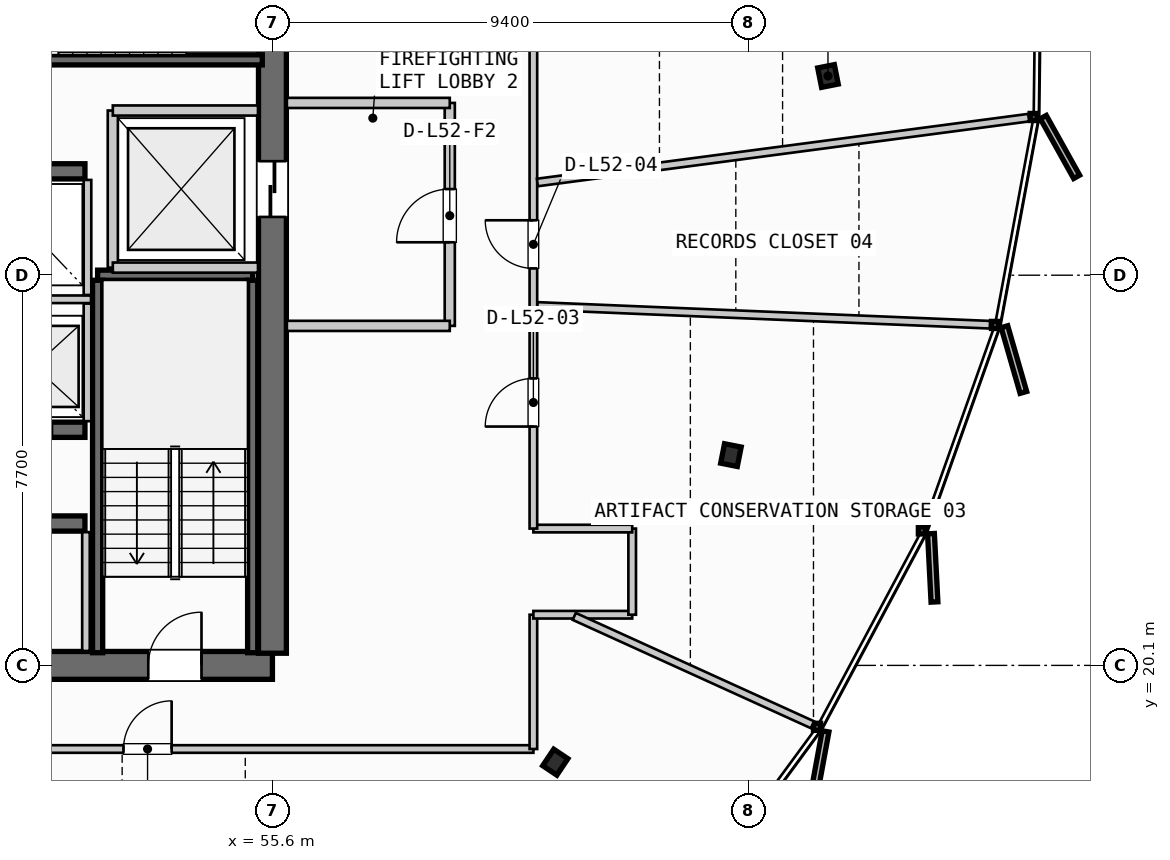
"""IFC4 building model, lengths in metres.
Left out: names, types, materials, properties, quantities, classifications, styles, units other than length and angle.
Written with IfcOpenShell. Run it as: python <this file> out.ifc"""

import sys

from ifc_helpers import new_model, si_unit, direction, frame, frame_2d, origin, origin_2d, place, context, subcontext, project, spatial, rectangle, i_section, extrude, source, transform, mapped, element, fill, save


model = new_model("IFC4")
c1 = context("Model", 3, precision=1e-05, world=origin(), true_north=direction((0.0, 1.0)))
c2 = subcontext(c1, "Body", "Model", "MODEL_VIEW")
j1 = project(units=[si_unit("LENGTHUNIT", "METRE"), si_unit("PLANEANGLEUNIT", "RADIAN")], contexts=[c1])
p1 = place(None, origin())
s1 = spatial("IfcSite", under=j1, at=p1, CompositionType="ELEMENT")
p2 = place(p1, origin())
s2 = spatial("IfcBuilding", under=s1, at=p2, CompositionType="ELEMENT")
p3 = place(p2, frame((0.0, 0.0, 200.9)))
s3 = spatial("IfcBuildingStorey", under=s2, at=p3, CompositionType="ELEMENT", Elevation=200.9)
p4 = place(p3, frame((38.0, 20.1, 0.0), z_axis=(0.0, 0.0, 1.0), x_axis=(1.0, 0.0, 0.0)))
e1 = element("IfcWall", 1, at=p4, inside=s3, PredefinedType="SHEAR", context=c2, shape_type="SweptSolid", body=[
    extrude(rectangle(XDim=17.6, YDim=0.55, at=frame_2d((8.8, 0.0))), origin(), (0.0, 0.0, 1.0), 3.26),
])
p5 = place(p4, frame((1.4, 0.0, 0.0)))
e2 = element("IfcOpeningElement", 2, at=p5, cuts=e1, PredefinedType="OPENING", context=c2, shape_type="SweptSolid", body=[
    extrude(rectangle(XDim=1.05, YDim=2.15, at=frame_2d((0.525, 1.075))), frame((0.0, 0.285, 0.0), z_axis=(0.0, -1.0, 0.0), x_axis=(1.0, 0.0, 0.0)), (0.0, 0.0, 1.0), 0.57),
])
p6 = place(p4, frame((15.15, 0.0, 0.0)))
e3 = element("IfcOpeningElement", 3, at=p6, cuts=e1, PredefinedType="OPENING", context=c2, shape_type="SweptSolid", body=[
    extrude(rectangle(XDim=1.05, YDim=2.15, at=frame_2d((0.525, 1.075))), frame((0.0, 0.285, 0.0), z_axis=(0.0, -1.0, 0.0), x_axis=(1.0, 0.0, 0.0)), (0.0, 0.0, 1.0), 0.57),
])
p7 = place(p4, frame((5.25, 0.0, 0.0)))
e4 = element("IfcOpeningElement", 4, at=p7, cuts=e1, PredefinedType="OPENING", context=c2, shape_type="SweptSolid", body=[
    extrude(rectangle(XDim=0.95, YDim=2.15, at=frame_2d((0.475, 1.075))), frame((0.0, 0.285, 0.0), z_axis=(0.0, -1.0, 0.0), x_axis=(1.0, 0.0, 0.0)), (0.0, 0.0, 1.0), 0.57),
])
p8 = place(p4, frame((11.4, 0.0, 0.0)))
e5 = element("IfcOpeningElement", 5, at=p8, cuts=e1, PredefinedType="OPENING", context=c2, shape_type="SweptSolid", body=[
    extrude(rectangle(XDim=0.95, YDim=2.15, at=frame_2d((0.475, 1.075))), frame((0.0, 0.285, 0.0), z_axis=(0.0, -1.0, 0.0), x_axis=(1.0, 0.0, 0.0)), (0.0, 0.0, 1.0), 0.57),
])
p9 = place(p3, frame((55.6, 20.34, 0.0), z_axis=(0.0, 0.0, 1.0), x_axis=(0.0, 1.0, 0.0)))
e6 = element("IfcWall", 6, at=p9, inside=s3, PredefinedType="SHEAR", context=c2, shape_type="SweptSolid", body=[
    extrude(rectangle(XDim=14.92, YDim=0.55, at=frame_2d((7.46, 0.0))), origin(), (0.0, 0.0, 1.0), 3.26),
])
p10 = place(p9, frame((12.71, 0.0, 0.0)))
e7 = element("IfcOpeningElement", 7, at=p10, cuts=e6, PredefinedType="OPENING", context=c2, shape_type="SweptSolid", body=[
    extrude(rectangle(XDim=1.05, YDim=2.15, at=frame_2d((0.525, 1.075))), frame((0.0, 0.285, 0.0), z_axis=(0.0, -1.0, 0.0), x_axis=(1.0, 0.0, 0.0)), (0.0, 0.0, 1.0), 0.57),
])
p11 = place(p9, frame((8.61, 0.0, 0.0)))
e8 = element("IfcOpeningElement", 8, at=p11, cuts=e6, PredefinedType="OPENING", context=c2, shape_type="SweptSolid", body=[
    extrude(rectangle(XDim=1.1, YDim=2.2, at=frame_2d((0.55, 1.1))), frame((0.0, 0.285, 0.0), z_axis=(0.0, -1.0, 0.0), x_axis=(1.0, 0.0, 0.0)), (0.0, 0.0, 1.0), 0.57),
])
p12 = place(p3, frame((47.65, 22.9, 0.0), z_axis=(0.0, 0.0, 1.0), x_axis=(1.0, 0.0, 0.0)))
e9 = element("IfcWall", 9, at=p12, inside=s3, PredefinedType="SHEAR", context=c2, shape_type="SweptSolid", body=[
    extrude(rectangle(XDim=4.25, YDim=0.3, at=frame_2d((2.125, 0.0))), origin(), (0.0, 0.0, 1.0), 3.26),
])
p13 = place(p3, frame((47.65, 24.75, 0.0), z_axis=(0.0, 0.0, 1.0), x_axis=(1.0, 0.0, 0.0)))
e10 = element("IfcWall", 10, at=p13, inside=s3, PredefinedType="SHEAR", context=c2, shape_type="SweptSolid", body=[
    extrude(rectangle(XDim=4.25, YDim=0.3, at=frame_2d((2.125, 0.0))), origin(), (0.0, 0.0, 1.0), 3.26),
])
p14 = place(p13, frame((0.45, 0.0, 0.0)))
e11 = element("IfcOpeningElement", 11, at=p14, cuts=e10, PredefinedType="OPENING", context=c2, shape_type="SweptSolid", body=[
    extrude(rectangle(XDim=1.1, YDim=2.2, at=frame_2d((0.55, 1.1))), frame((0.0, 0.16, 0.0), z_axis=(0.0, -1.0, 0.0), x_axis=(1.0, 0.0, 0.0)), (0.0, 0.0, 1.0), 0.32),
])
p15 = place(p13, frame((2.5, 0.0, 0.0)))
e12 = element("IfcOpeningElement", 12, at=p15, cuts=e10, PredefinedType="OPENING", context=c2, shape_type="SweptSolid", body=[
    extrude(rectangle(XDim=1.1, YDim=2.2, at=frame_2d((0.55, 1.1))), frame((0.0, 0.16, 0.0), z_axis=(0.0, -1.0, 0.0), x_axis=(1.0, 0.0, 0.0)), (0.0, 0.0, 1.0), 0.32),
])
p16 = place(p3, frame((47.65, 29.85, 0.0), z_axis=(0.0, 0.0, 1.0), x_axis=(1.0, 0.0, 0.0)))
e13 = element("IfcWall", 13, at=p16, inside=s3, PredefinedType="SHEAR", context=c2, shape_type="SweptSolid", body=[
    extrude(rectangle(XDim=4.25, YDim=0.3, at=frame_2d((2.125, 0.0))), origin(), (0.0, 0.0, 1.0), 3.26),
])
m1 = source(origin(), c2, "Body", "SweptSolid", [
    extrude(i_section(OverallWidth=0.391, OverallDepth=0.335, WebThickness=0.023, FlangeThickness=0.034, FilletRadius=0.015, at=origin_2d()), origin(), (0.0, 0.0, 1.0), 3.26),
])
for number, where, z_axis, x_axis in (
    (14, (66.564, 31.731, 0.0), (0.0, 0.0, 1.0), (0.981, 0.195, 0.0)),
    (15, (61.183, 18.19, 0.0), (0.0, 0.0, 1.0), (0.831, -0.556, 0.0)),
    (16, (64.649, 24.25, 0.0), (0.0, 0.0, 1.0), (0.981, -0.195, 0.0)),
):
    element("IfcColumn", number, at=place(p3, frame(where, z_axis=z_axis, x_axis=x_axis)), inside=s3, PredefinedType="COLUMN", context=c2, shape_type="MappedRepresentation", body=[
        mapped(m1, transform((0.0, 0.0, 0.0), scale=1.0)),
    ])
p17 = place(p3, frame((52.15, 27.8, 0.0), z_axis=(0.0, 0.0, 1.0), x_axis=(1.0, 0.0, 0.0)))
e17 = element("IfcWall", 17, at=p17, inside=s3, PredefinedType="SHEAR", context=c2, shape_type="SweptSolid", body=[
    extrude(rectangle(XDim=3.06, YDim=0.2, at=frame_2d((1.53, 0.0))), origin(), (0.0, 0.0, 1.0), 3.26),
])
for number, where, z_axis, x_axis in (
    (18, (55.21, 27.7, 0.0), (0.0, 0.0, 1.0), (0.0, -1.0, 0.0)),
    (19, (52.15, 20.35, 0.0), (0.0, 0.0, 1.0), (0.0, 1.0, 0.0)),
    (20, (55.4, 32.05, 0.0), (0.0, 0.0, 1.0), (-1.0, 0.0, 0.0)),
):
    element("IfcWall", number, at=place(p3, frame(where, z_axis=z_axis, x_axis=x_axis)), inside=s3, PredefinedType="SHEAR", context=c2, shape_type="SweptSolid", body=[
        extrude(rectangle(XDim=7.35, YDim=0.2, at=frame_2d((3.675, 0.0))), origin(), (0.0, 0.0, 1.0), 3.26),
    ])
p18 = place(p3, frame((52.45, 27.95, 0.0), z_axis=(0.0, 0.0, 1.0), x_axis=(0.0, 1.0, 0.0)))
e21 = element("IfcWall", 21, at=p18, inside=s3, PredefinedType="PARTITIONING", context=c2, shape_type="SweptSolid", body=[
    extrude(rectangle(XDim=3.1, YDim=0.2, at=frame_2d((1.55, 0.0))), origin(), (0.0, 0.0, 1.0), 2.595),
])
for number, where, z_axis, x_axis in (
    (22, (52.45, 27.95, 0.0), (0.0, 0.0, 1.0), (1.0, 0.0, 0.0)),
    (23, (52.45, 31.05, 0.0), (0.0, 0.0, 1.0), (1.0, 0.0, 0.0)),
):
    element("IfcWall", number, at=place(p3, frame(where, z_axis=z_axis, x_axis=x_axis)), inside=s3, PredefinedType="PARTITIONING", context=c2, shape_type="SweptSolid", body=[
        extrude(rectangle(XDim=2.865, YDim=0.2, at=frame_2d((1.433, 0.0))), origin(), (0.0, 0.0, 1.0), 2.595),
    ])
p19 = place(p3, frame((59.1, 26.8, 0.0), z_axis=(0.0, 0.0, 1.0), x_axis=(0.0, 1.0, 0.0)))
e24 = element("IfcWall", 24, at=p19, inside=s3, PredefinedType="PARTITIONING", context=c2, shape_type="SweptSolid", body=[
    extrude(rectangle(XDim=4.4, YDim=0.2, at=frame_2d((2.2, 0.0))), origin(), (0.0, 0.0, 1.0), 2.595),
])
p20 = place(p19, frame((1.65, 0.0, 0.0)))
e25 = element("IfcOpeningElement", 25, at=p20, cuts=e24, PredefinedType="OPENING", context=c2, shape_type="SweptSolid", body=[
    extrude(rectangle(XDim=1.05, YDim=2.15, at=frame_2d((0.525, 1.075))), frame((0.0, 0.11, 0.0), z_axis=(0.0, -1.0, 0.0), x_axis=(1.0, 0.0, 0.0)), (0.0, 0.0, 1.0), 0.22),
])
for number, where, z_axis, x_axis in (
    (26, (55.885, 26.8, 0.0), (0.0, 0.0, 1.0), (1.0, 0.0, 0.0)),
    (27, (55.885, 31.2, 0.0), (0.0, 0.0, 1.0), (1.0, 0.0, 0.0)),
):
    element("IfcWall", number, at=place(p3, frame(where, z_axis=z_axis, x_axis=x_axis)), inside=s3, PredefinedType="PARTITIONING", context=c2, shape_type="SweptSolid", body=[
        extrude(rectangle(XDim=3.215, YDim=0.2, at=frame_2d((1.607, 0.0))), origin(), (0.0, 0.0, 1.0), 2.595),
    ])
p21 = place(p3, frame((51.92, 20.385, 0.0), z_axis=(0.0, 0.0, 1.0), x_axis=(0.0, 1.0, 0.0)))
e28 = element("IfcWall", 28, at=p21, inside=s3, PredefinedType="PARTITIONING", context=c2, shape_type="SweptSolid", body=[
    extrude(rectangle(XDim=2.345, YDim=0.15, at=frame_2d((1.172, 0.0))), origin(), (0.0, 0.0, 1.0), 2.595),
])
p22 = place(p3, frame((47.7, 27.325, 0.0), z_axis=(0.0, 0.0, 1.0), x_axis=(1.0, 0.0, 0.0)))
e29 = element("IfcWall", 29, at=p22, inside=s3, PredefinedType="PARTITIONING", context=c2, shape_type="SweptSolid", body=[
    extrude(rectangle(XDim=4.32, YDim=0.15, at=frame_2d((2.16, 0.0))), origin(), (0.0, 0.0, 1.0), 2.595),
])
p23 = place(p3, frame((51.95, 24.92, 0.0), z_axis=(0.0, 0.0, 1.0), x_axis=(0.0, 1.0, 0.0)))
e30 = element("IfcWall", 30, at=p23, inside=s3, PredefinedType="PARTITIONING", context=c2, shape_type="SweptSolid", body=[
    extrude(rectangle(XDim=2.32, YDim=0.15, at=frame_2d((1.16, 0.0))), origin(), (0.0, 0.0, 1.0), 2.595),
])
p24 = place(p3, frame((51.95, 27.41, 0.0), z_axis=(0.0, 0.0, 1.0), x_axis=(0.0, 1.0, 0.0)))
e31 = element("IfcWall", 31, at=p24, inside=s3, PredefinedType="PARTITIONING", context=c2, shape_type="SweptSolid", body=[
    extrude(rectangle(XDim=2.27, YDim=0.15, at=frame_2d((1.135, 0.0))), origin(), (0.0, 0.0, 1.0), 2.595),
])
p25 = place(p3, frame((32.4, 18.45, 0.0), z_axis=(0.0, 0.0, 1.0), x_axis=(1.0, 0.0, 0.0)))
e32 = element("IfcWall", 32, at=p25, inside=s3, PredefinedType="PARTITIONING", context=c2, shape_type="SweptSolid", body=[
    extrude(rectangle(XDim=28.35, YDim=0.15, at=frame_2d((14.175, 0.0))), origin(), (0.0, 0.0, 1.0), 2.595),
])
p26 = place(p25, frame((8.202, 0.0, 0.0)))
e33 = element("IfcOpeningElement", 33, at=p26, cuts=e32, PredefinedType="OPENING", context=c2, shape_type="SweptSolid", body=[
    extrude(rectangle(XDim=0.95, YDim=2.15, at=frame_2d((0.475, 1.075))), frame((0.0, 0.085, 0.0), z_axis=(0.0, -1.0, 0.0), x_axis=(1.0, 0.0, 0.0)), (0.0, 0.0, 1.0), 0.17),
])
p27 = place(p25, frame((20.261, 0.0, 0.0)))
e34 = element("IfcOpeningElement", 34, at=p27, cuts=e32, PredefinedType="OPENING", context=c2, shape_type="SweptSolid", body=[
    extrude(rectangle(XDim=0.95, YDim=2.15, at=frame_2d((0.475, 1.075))), frame((0.0, 0.085, 0.0), z_axis=(0.0, -1.0, 0.0), x_axis=(1.0, 0.0, 0.0)), (0.0, 0.0, 1.0), 0.17),
])
p28 = place(p3, frame((60.75, 18.45, 0.0), z_axis=(0.0, 0.0, 1.0), x_axis=(0.0, 1.0, 0.0)))
e35 = element("IfcWall", 35, at=p28, inside=s3, PredefinedType="PARTITIONING", context=c2, shape_type="SweptSolid", body=[
    extrude(rectangle(XDim=2.65, YDim=0.15, at=frame_2d((1.325, 0.0))), origin(), (0.0, 0.0, 1.0), 2.595),
])
p29 = place(p3, frame((60.75, 21.1, 0.0), z_axis=(0.0, 0.0, 1.0), x_axis=(1.0, 0.0, 0.0)))
e36 = element("IfcWall", 36, at=p29, inside=s3, PredefinedType="PARTITIONING", context=c2, shape_type="SweptSolid", body=[
    extrude(rectangle(XDim=1.95, YDim=0.15, at=frame_2d((0.975, 0.0))), origin(), (0.0, 0.0, 1.0), 2.595),
])
p30 = place(p3, frame((62.7, 21.1, 0.0), z_axis=(0.0, 0.0, 1.0), x_axis=(0.0, 1.0, 0.0)))
e37 = element("IfcWall", 37, at=p30, inside=s3, PredefinedType="PARTITIONING", context=c2, shape_type="SweptSolid", body=[
    extrude(rectangle(XDim=1.7, YDim=0.15, at=frame_2d((0.85, 0.0))), origin(), (0.0, 0.0, 1.0), 2.595),
])
p31 = place(p3, frame((62.7, 22.8, 0.0), z_axis=(0.0, 0.0, 1.0), x_axis=(-1.0, 0.0, 0.0)))
e38 = element("IfcWall", 38, at=p31, inside=s3, PredefinedType="PARTITIONING", context=c2, shape_type="SweptSolid", body=[
    extrude(rectangle(XDim=1.95, YDim=0.15, at=frame_2d((0.975, 0.0))), origin(), (0.0, 0.0, 1.0), 2.595),
])
p32 = place(p3, frame((60.75, 22.8, 0.0), z_axis=(0.0, 0.0, 1.0), x_axis=(0.0, 1.0, 0.0)))
e39 = element("IfcWall", 39, at=p32, inside=s3, PredefinedType="PARTITIONING", context=c2, shape_type="SweptSolid", body=[
    extrude(rectangle(XDim=10.0, YDim=0.15, at=frame_2d((5.0, 0.0))), origin(), (0.0, 0.0, 1.0), 2.595),
])
p33 = place(p32, frame((2.013, 0.0, 0.0)))
e40 = element("IfcOpeningElement", 40, at=p33, cuts=e39, PredefinedType="OPENING", context=c2, shape_type="SweptSolid", body=[
    extrude(rectangle(XDim=0.95, YDim=2.15, at=frame_2d((0.475, 1.075))), frame((0.0, 0.085, 0.0), z_axis=(0.0, -1.0, 0.0), x_axis=(1.0, 0.0, 0.0)), (0.0, 0.0, 1.0), 0.17),
])
p34 = place(p32, frame((5.134, 0.0, 0.0)))
e41 = element("IfcOpeningElement", 41, at=p34, cuts=e39, PredefinedType="OPENING", context=c2, shape_type="SweptSolid", body=[
    extrude(rectangle(XDim=0.95, YDim=2.15, at=frame_2d((0.475, 1.075))), frame((0.0, 0.085, 0.0), z_axis=(0.0, -1.0, 0.0), x_axis=(1.0, 0.0, 0.0)), (0.0, 0.0, 1.0), 0.17),
])
p35 = place(p3, frame((61.556, 21.067, 0.0), z_axis=(0.0, 0.0, 1.0), x_axis=(0.910308185416, -0.413931162833, 0.0)))
e42 = element("IfcWall", 42, at=p35, inside=s3, PredefinedType="PARTITIONING", context=c2, shape_type="SweptSolid", body=[
    extrude(rectangle(XDim=5.164, YDim=0.15, at=frame_2d((2.582, 0.0))), origin(), (0.0, 0.0, 1.0), 2.595),
])
p36 = place(p3, frame((60.83, 27.194, 0.0), z_axis=(0.0, 0.0, 1.0), x_axis=(0.999138838982, -0.041491932211, 0.0)))
e43 = element("IfcWall", 43, at=p36, inside=s3, PredefinedType="PARTITIONING", context=c2, shape_type="SweptSolid", body=[
    extrude(rectangle(XDim=8.938, YDim=0.15, at=frame_2d((4.469, 0.0))), origin(), (0.0, 0.0, 1.0), 2.595),
])
p37 = place(p3, frame((60.829, 29.63, 0.0), z_axis=(0.0, 0.0, 1.0), x_axis=(0.991403406957, 0.130840684324, 0.0)))
e44 = element("IfcWall", 44, at=p37, inside=s3, PredefinedType="PARTITIONING", context=c2, shape_type="SweptSolid", body=[
    extrude(rectangle(XDim=9.779, YDim=0.15, at=frame_2d((4.89, 0.0))), origin(), (0.0, 0.0, 1.0), 2.595),
])
m2 = source(origin(), c2, "Body", "SweptSolid", [
    extrude(rectangle(XDim=1.05, YDim=2.15, at=frame_2d((0.525, 1.075))), frame((0.0, 0.025, 0.0), z_axis=(0.0, -1.0, 0.0), x_axis=(1.0, 0.0, 0.0)), (0.0, 0.0, 1.0), 0.05),
])
p38 = place(p6, origin())
e45 = element("IfcDoor", 45, at=p38, inside=s3, OperationType="SINGLE_SWING_RIGHT", PredefinedType="DOOR", context=c2, shape_type="MappedRepresentation", body=[
    mapped(m2, transform((0.0, 0.0, 0.0), scale=1.0)),
])
fill(e3, e45)
m3 = source(origin(), c2, "Body", "SweptSolid", [
    extrude(rectangle(XDim=1.1, YDim=2.2, at=frame_2d((0.55, 1.1))), frame((0.0, 0.025, 0.0), z_axis=(0.0, -1.0, 0.0), x_axis=(1.0, 0.0, 0.0)), (0.0, 0.0, 1.0), 0.05),
])
p39 = place(p11, origin())
e46 = element("IfcDoor", 46, at=p39, inside=s3, OperationType="SLIDING_TO_RIGHT", PredefinedType="DOOR", context=c2, shape_type="MappedRepresentation", body=[
    mapped(m3, transform((0.0, 0.0, 0.0), scale=1.0)),
])
fill(e8, e46)
p40 = place(p20, origin())
e47 = element("IfcDoor", 47, at=p40, inside=s3, OperationType="SINGLE_SWING_LEFT", PredefinedType="DOOR", context=c2, shape_type="MappedRepresentation", body=[
    mapped(m2, transform((0.0, 0.0, 0.0), scale=1.0)),
])
fill(e25, e47)
m4 = source(origin(), c2, "Body", "SweptSolid", [
    extrude(rectangle(XDim=0.95, YDim=2.15, at=frame_2d((0.475, 1.075))), frame((0.0, 0.025, 0.0), z_axis=(0.0, -1.0, 0.0), x_axis=(1.0, 0.0, 0.0)), (0.0, 0.0, 1.0), 0.05),
])
p41 = place(p27, origin())
e48 = element("IfcDoor", 48, at=p41, inside=s3, OperationType="SINGLE_SWING_RIGHT", PredefinedType="DOOR", context=c2, shape_type="MappedRepresentation", body=[
    mapped(m4, transform((0.0, 0.0, 0.0), scale=1.0)),
])
fill(e34, e48)
p42 = place(p33, origin())
e49 = element("IfcDoor", 49, at=p42, inside=s3, OperationType="SINGLE_SWING_LEFT", PredefinedType="DOOR", context=c2, shape_type="MappedRepresentation", body=[
    mapped(m4, transform((0.0, 0.0, 0.0), scale=1.0)),
])
fill(e40, e49)
p43 = place(p34, origin())
e50 = element("IfcDoor", 50, at=p43, inside=s3, OperationType="SINGLE_SWING_RIGHT", PredefinedType="DOOR", context=c2, shape_type="MappedRepresentation", body=[
    mapped(m4, transform((0.0, 0.0, 0.0), scale=1.0)),
])
fill(e41, e50)
save(model, sys.argv[1])
